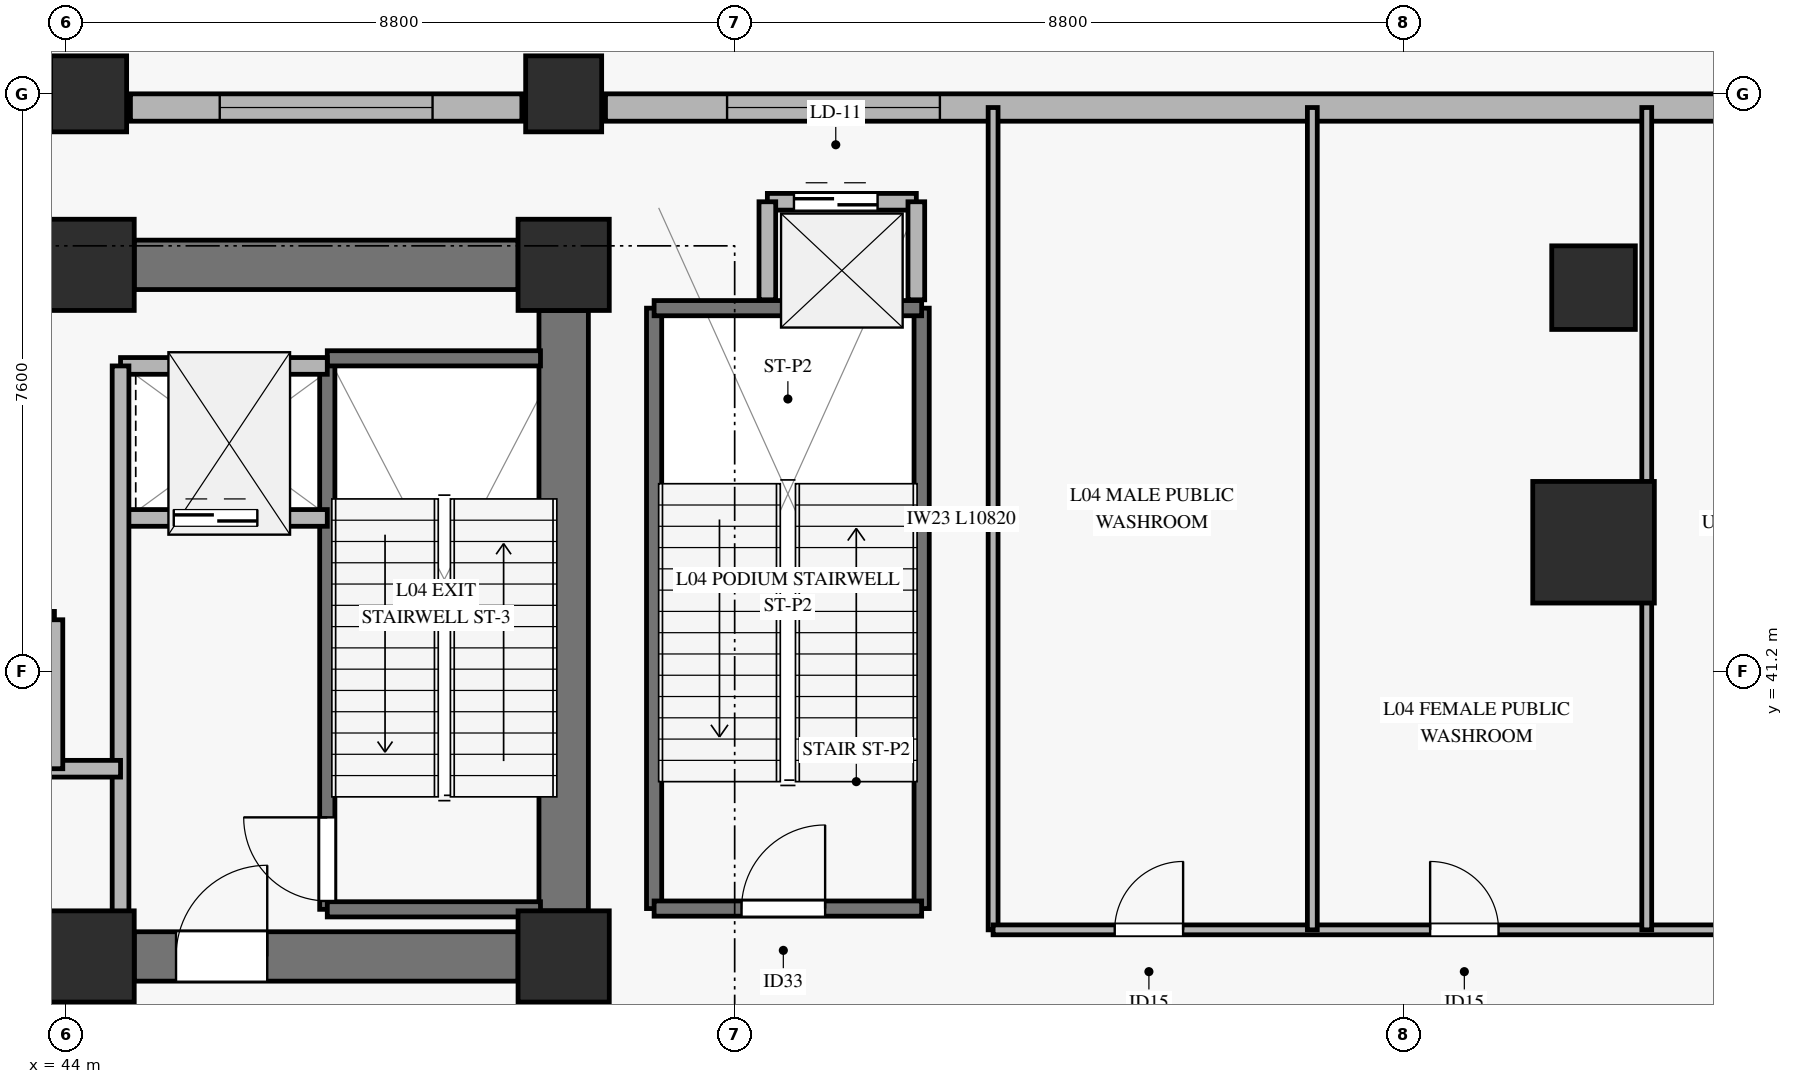
"""IFC4 building model, lengths in metres.
Left out: names, types, materials, properties, quantities, classifications, styles, units other than length and angle.
Written with IfcOpenShell. Run it as: python <this file> out.ifc"""

import sys

from ifc_helpers import new_model, si_unit, direction, frame, frame_2d, origin, origin_2d, place, context, subcontext, project, spatial, rectangle, hollow_rectangle, extrude, source, transform, mapped, element, fill, save


model = new_model("IFC4")
c1 = context("Model", 3, precision=1e-05, world=origin(), true_north=direction((0.0, 1.0)))
c2 = subcontext(c1, "Body", "Model", "MODEL_VIEW")
j1 = project(units=[si_unit("LENGTHUNIT", "METRE"), si_unit("PLANEANGLEUNIT", "RADIAN")], contexts=[c1])
p1 = place(None, origin())
s1 = spatial("IfcSite", under=j1, at=p1, CompositionType="ELEMENT")
p2 = place(p1, origin())
s2 = spatial("IfcBuilding", under=s1, at=p2, CompositionType="ELEMENT")
p3 = place(p2, frame((0.0, 0.0, 15.2)))
s3 = spatial("IfcBuildingStorey", under=s2, at=p3, CompositionType="ELEMENT", Elevation=15.2)
m1 = source(origin(), c2, "Body", "SweptSolid", [
    extrude(rectangle(XDim=1.2, YDim=1.2, at=origin_2d()), origin(), (0.0, 0.0, 1.0), 4.65),
])
for number, where, z_axis, x_axis in (
    (1, (44.3, 37.45, 0.0), (0.0, 0.0, 1.0), (1.0, 0.0, 0.0)),
    (2, (44.3, 46.55, 0.0), (0.0, 0.0, 1.0), (1.0, 0.0, 0.0)),
    (3, (50.55, 37.45, 0.0), (0.0, 0.0, 1.0), (1.0, 0.0, 0.0)),
    (4, (50.55, 46.55, 0.0), (0.0, 0.0, 1.0), (1.0, 0.0, 0.0)),
):
    element("IfcColumn", number, at=place(p3, frame(where, z_axis=z_axis, x_axis=x_axis)), inside=s3, PredefinedType="PILASTER", context=c2, shape_type="MappedRepresentation", body=[
        mapped(m1, transform((0.0, 0.0, 0.0), x_axis=(1.0, 0.0, 0.0), y_axis=(0.0, 1.0, 0.0), z_axis=(0.0, 0.0, 1.0), scale=1.0)),
    ])
p4 = place(p3, frame((44.9, 46.55, 0.0), z_axis=(0.0, 0.0, 1.0), x_axis=(1.0, 0.0, 0.0)))
e5 = element("IfcWall", 5, at=p4, inside=s3, PredefinedType="SHEAR", context=c2, shape_type="SweptSolid", body=[
    extrude(rectangle(XDim=5.05, YDim=0.65, at=frame_2d((2.525, 0.0))), origin(), (0.0, 0.0, 1.0), 4.65),
])
p5 = place(p3, frame((44.9, 37.45, 0.0), z_axis=(0.0, 0.0, 1.0), x_axis=(1.0, 0.0, 0.0)))
e6 = element("IfcWall", 6, at=p5, inside=s3, PredefinedType="SHEAR", context=c2, shape_type="SweptSolid", body=[
    extrude(rectangle(XDim=5.05, YDim=0.65, at=frame_2d((2.525, 0.0))), origin(), (0.0, 0.0, 1.0), 4.65),
])
p6 = place(p5, frame((0.55, 0.0, 0.0)))
e7 = element("IfcOpeningElement", 7, at=p6, cuts=e6, PredefinedType="OPENING", context=c2, shape_type="SweptSolid", body=[
    extrude(rectangle(XDim=1.2, YDim=2.15, at=frame_2d((0.6, 1.075))), frame((0.0, 0.335, 0.0), z_axis=(0.0, -1.0, 0.0), x_axis=(1.0, 0.0, 0.0)), (0.0, 0.0, 1.0), 0.67),
])
p7 = place(p3, frame((50.55, 38.05, 0.0), z_axis=(0.0, 0.0, 1.0), x_axis=(0.0, 1.0, 0.0)))
e8 = element("IfcWall", 8, at=p7, inside=s3, PredefinedType="SHEAR", context=c2, shape_type="SweptSolid", body=[
    extrude(rectangle(XDim=7.9, YDim=0.65, at=frame_2d((3.95, 0.0))), origin(), (0.0, 0.0, 1.0), 4.65),
])
m2 = source(origin(), c2, "Body", "SweptSolid", [
    extrude(hollow_rectangle(XDim=1.6, YDim=1.6, WallThickness=0.075, at=origin_2d()), origin(), (0.0, 0.0, 1.0), 4.65),
])
p8 = place(p3, frame((64.1, 42.9, 0.0), z_axis=(0.0, 0.0, 1.0), x_axis=(1.0, 0.0, 0.0)))
e9 = element("IfcColumn", 9, at=p8, inside=s3, PredefinedType="COLUMN", context=c2, shape_type="MappedRepresentation", body=[
    mapped(m2, transform((0.0, 0.0, 0.0), x_axis=(1.0, 0.0, 0.0), y_axis=(0.0, 1.0, 0.0), z_axis=(0.0, 0.0, 1.0), scale=1.0)),
])
m3 = source(origin(), c2, "Body", "SweptSolid", [
    extrude(hollow_rectangle(XDim=1.1, YDim=1.1, WallThickness=0.05, at=origin_2d()), origin(), (0.0, 0.0, 1.0), 4.65),
])
p9 = place(p3, frame((64.1, 46.25, 0.0), z_axis=(0.0, 0.0, 1.0), x_axis=(1.0, 0.0, 0.0)))
e10 = element("IfcColumn", 10, at=p9, inside=s3, PredefinedType="COLUMN", context=c2, shape_type="MappedRepresentation", body=[
    mapped(m3, transform((0.0, 0.0, 0.0), x_axis=(1.0, 0.0, 0.0), y_axis=(0.0, 1.0, 0.0), z_axis=(0.0, 0.0, 1.0), scale=1.0)),
])
m4 = source(origin(), c2, "Body", "SweptSolid", [
    extrude(hollow_rectangle(XDim=1.0, YDim=1.0, WallThickness=0.045, at=origin_2d()), origin(), (0.0, 0.0, 1.0), 4.65),
])
for number, where, z_axis, x_axis in (
    (11, (44.3, 48.8, 0.0), (0.0, 0.0, 1.0), (1.0, 0.0, 0.0)),
    (12, (50.55, 48.8, 0.0), (0.0, 0.0, 1.0), (1.0, 0.0, 0.0)),
):
    element("IfcColumn", number, at=place(p3, frame(where, z_axis=z_axis, x_axis=x_axis)), inside=s3, PredefinedType="COLUMN", context=c2, shape_type="MappedRepresentation", body=[
        mapped(m4, transform((0.0, 0.0, 0.0), x_axis=(1.0, 0.0, 0.0), y_axis=(0.0, 1.0, 0.0), z_axis=(0.0, 0.0, 1.0), scale=1.0)),
    ])
p10 = place(p3, frame((44.85, 48.62, 0.0), z_axis=(0.0, 0.0, 1.0), x_axis=(1.0, 0.0, 0.0)))
e13 = element("IfcWall", 13, at=p10, inside=s3, PredefinedType="SOLIDWALL", context=c2, shape_type="SweptSolid", body=[
    extrude(rectangle(XDim=5.15, YDim=0.36, at=frame_2d((2.575, 0.0))), origin(), (0.0, 0.0, 1.0), 3.53),
])
p11 = place(p10, frame((1.175, 0.0, 0.72)))
e14 = element("IfcOpeningElement", 14, at=p11, cuts=e13, PredefinedType="OPENING", context=c2, shape_type="SweptSolid", body=[
    extrude(rectangle(XDim=2.8, YDim=2.0, at=frame_2d((1.4, 1.0))), frame((0.0, 0.19, 0.0), z_axis=(0.0, -1.0, 0.0), x_axis=(1.0, 0.0, 0.0)), (0.0, 0.0, 1.0), 0.38),
])
p12 = place(p3, frame((51.1, 48.62, 0.0), z_axis=(0.0, 0.0, 1.0), x_axis=(1.0, 0.0, 0.0)))
e15 = element("IfcWall", 15, at=p12, inside=s3, PredefinedType="SOLIDWALL", context=c2, shape_type="SweptSolid", body=[
    extrude(rectangle(XDim=17.95, YDim=0.36, at=frame_2d((8.975, 0.0))), origin(), (0.0, 0.0, 1.0), 3.53),
])
p13 = place(p12, frame((1.6, 0.0, 0.72)))
e16 = element("IfcOpeningElement", 16, at=p13, cuts=e15, PredefinedType="OPENING", context=c2, shape_type="SweptSolid", body=[
    extrude(rectangle(XDim=2.8, YDim=2.0, at=frame_2d((1.4, 1.0))), frame((0.0, 0.19, 0.0), z_axis=(0.0, -1.0, 0.0), x_axis=(1.0, 0.0, 0.0)), (0.0, 0.0, 1.0), 0.38),
])
p14 = place(p3, frame((47.44, 38.07, 0.0), z_axis=(0.0, 0.0, 1.0), x_axis=(0.0, 1.0, 0.0)))
e17 = element("IfcWall", 17, at=p14, inside=s3, PredefinedType="SOLIDWALL", context=c2, shape_type="SweptSolid", body=[
    extrude(rectangle(XDim=7.25, YDim=0.2, at=frame_2d((3.625, 0.0))), origin(), (0.0, 0.0, 1.0), 5.0),
])
p15 = place(p14, frame((0.11, 0.0, 0.0)))
e18 = element("IfcOpeningElement", 18, at=p15, cuts=e17, PredefinedType="OPENING", context=c2, shape_type="SweptSolid", body=[
    extrude(rectangle(XDim=1.1, YDim=2.15, at=frame_2d((0.55, 1.075))), frame((0.0, 0.11, 0.0), z_axis=(0.0, -1.0, 0.0), x_axis=(1.0, 0.0, 0.0)), (0.0, 0.0, 1.0), 0.22),
])
for number, where, z_axis, x_axis in (
    (19, (47.44, 45.32, 0.0), (0.0, 0.0, 1.0), (1.0, 0.0, 0.0)),
    (20, (47.44, 38.07, 0.0), (0.0, 0.0, 1.0), (1.0, 0.0, 0.0)),
):
    element("IfcWall", number, at=place(p3, frame(where, z_axis=z_axis, x_axis=x_axis)), inside=s3, PredefinedType="SOLIDWALL", context=c2, shape_type="SweptSolid", body=[
        extrude(rectangle(XDim=2.805, YDim=0.2, at=frame_2d((1.403, 0.0))), origin(), (0.0, 0.0, 1.0), 5.0),
    ])
p16 = place(p3, frame((44.72, 43.22, 0.0), z_axis=(0.0, 0.0, 1.0), x_axis=(1.0, 0.0, 0.0)))
e21 = element("IfcWall", 21, at=p16, inside=s3, PredefinedType="SOLIDWALL", context=c2, shape_type="SweptSolid", body=[
    extrude(rectangle(XDim=2.72, YDim=0.22, at=frame_2d((1.36, 0.0))), origin(), (0.0, 0.0, 1.0), 4.65),
])
p17 = place(p16, frame((0.7, 0.0, 0.0)))
e22 = element("IfcOpeningElement", 22, at=p17, cuts=e21, PredefinedType="OPENING", context=c2, shape_type="SweptSolid", body=[
    extrude(rectangle(XDim=1.1, YDim=2.2, at=frame_2d((0.55, 1.1))), frame((0.0, 0.12, 0.0), z_axis=(0.0, -1.0, 0.0), x_axis=(1.0, 0.0, 0.0)), (0.0, 0.0, 1.0), 0.24),
])
p18 = place(p3, frame((44.72, 45.22, 0.0), z_axis=(0.0, 0.0, 1.0), x_axis=(1.0, 0.0, 0.0)))
e23 = element("IfcWall", 23, at=p18, inside=s3, PredefinedType="SOLIDWALL", context=c2, shape_type="SweptSolid", body=[
    extrude(rectangle(XDim=2.72, YDim=0.22, at=frame_2d((1.36, 0.0))), origin(), (0.0, 0.0, 1.0), 4.65),
])
p19 = place(p3, frame((44.72, 37.755, 0.0), z_axis=(0.0, 0.0, 1.0), x_axis=(0.0, 1.0, 0.0)))
e24 = element("IfcWall", 24, at=p19, inside=s3, PredefinedType="SOLIDWALL", context=c2, shape_type="SweptSolid", body=[
    extrude(rectangle(XDim=7.465, YDim=0.22, at=frame_2d((3.732, 0.0))), origin(), (0.0, 0.0, 1.0), 4.65),
])
for number, where, z_axis, x_axis in (
    (25, (51.74, 38.08, 0.0), (0.0, 0.0, 1.0), (0.0, 1.0, 0.0)),
    (26, (55.26, 38.08, 0.0), (0.0, 0.0, 1.0), (0.0, 1.0, 0.0)),
):
    element("IfcWall", number, at=place(p3, frame(where, z_axis=z_axis, x_axis=x_axis)), inside=s3, PredefinedType="SOLIDWALL", context=c2, shape_type="SweptSolid", body=[
        extrude(rectangle(XDim=7.9, YDim=0.2, at=frame_2d((3.95, 0.0))), origin(), (0.0, 0.0, 1.0), 5.0),
    ])
p20 = place(p3, frame((51.74, 45.98, 0.0), z_axis=(0.0, 0.0, 1.0), x_axis=(1.0, 0.0, 0.0)))
e27 = element("IfcWall", 27, at=p20, inside=s3, PredefinedType="SOLIDWALL", context=c2, shape_type="SweptSolid", body=[
    extrude(rectangle(XDim=3.52, YDim=0.2, at=frame_2d((1.76, 0.0))), origin(), (0.0, 0.0, 1.0), 5.0),
])
p21 = place(p3, frame((51.74, 38.08, 0.0), z_axis=(0.0, 0.0, 1.0), x_axis=(1.0, 0.0, 0.0)))
e28 = element("IfcWall", 28, at=p21, inside=s3, PredefinedType="SOLIDWALL", context=c2, shape_type="SweptSolid", body=[
    extrude(rectangle(XDim=3.52, YDim=0.2, at=frame_2d((1.76, 0.0))), origin(), (0.0, 0.0, 1.0), 5.0),
])
p22 = place(p21, frame((1.15, 0.0, 0.0)))
e29 = element("IfcOpeningElement", 29, at=p22, cuts=e28, PredefinedType="OPENING", context=c2, shape_type="SweptSolid", body=[
    extrude(rectangle(XDim=1.1, YDim=2.15, at=frame_2d((0.55, 1.075))), frame((0.0, 0.11, 0.0), z_axis=(0.0, -1.0, 0.0), x_axis=(1.0, 0.0, 0.0)), (0.0, 0.0, 1.0), 0.22),
])
p23 = place(p3, frame((53.23, 47.38, 0.0), z_axis=(0.0, 0.0, 1.0), x_axis=(1.0, 0.0, 0.0)))
e30 = element("IfcWall", 30, at=p23, inside=s3, PredefinedType="SOLIDWALL", context=c2, shape_type="SweptSolid", body=[
    extrude(rectangle(XDim=1.96, YDim=0.22, at=frame_2d((0.98, 0.0))), origin(), (0.0, 0.0, 1.0), 4.65),
])
p24 = place(p23, frame((0.35, 0.0, 0.0)))
e31 = element("IfcOpeningElement", 31, at=p24, cuts=e30, PredefinedType="OPENING", context=c2, shape_type="SweptSolid", body=[
    extrude(rectangle(XDim=1.1, YDim=2.2, at=frame_2d((0.55, 1.1))), frame((0.0, 0.12, 0.0), z_axis=(0.0, -1.0, 0.0), x_axis=(1.0, 0.0, 0.0)), (0.0, 0.0, 1.0), 0.24),
])
for number, where, z_axis, x_axis in (
    (32, (53.23, 46.09, 0.0), (0.0, 0.0, 1.0), (0.0, 1.0, 0.0)),
    (33, (55.19, 46.09, 0.0), (0.0, 0.0, 1.0), (0.0, 1.0, 0.0)),
):
    element("IfcWall", number, at=place(p3, frame(where, z_axis=z_axis, x_axis=x_axis)), inside=s3, PredefinedType="SOLIDWALL", context=c2, shape_type="SweptSolid", body=[
        extrude(rectangle(XDim=1.29, YDim=0.22, at=frame_2d((0.645, 0.0))), origin(), (0.0, 0.0, 1.0), 4.65),
    ])
p25 = place(p3, frame((36.12, 41.88, 0.0), z_axis=(0.0, 0.0, 1.0), x_axis=(1.0, 0.0, 0.0)))
e34 = element("IfcWall", 34, at=p25, inside=s3, PredefinedType="SOLIDWALL", context=c2, shape_type="SweptSolid", body=[
    extrude(rectangle(XDim=7.73, YDim=0.22, at=frame_2d((3.865, 0.0))), origin(), (0.0, 0.0, 1.0), 4.65),
])
p26 = place(p25, frame((6.26, 0.0, 0.0)))
e35 = element("IfcOpeningElement", 35, at=p26, cuts=e34, PredefinedType="OPENING", context=c2, shape_type="SweptSolid", body=[
    extrude(rectangle(XDim=1.1, YDim=2.2, at=frame_2d((0.55, 1.1))), frame((0.0, 0.12, 0.0), z_axis=(0.0, -1.0, 0.0), x_axis=(1.0, 0.0, 0.0)), (0.0, 0.0, 1.0), 0.24),
])
p27 = place(p3, frame((36.12, 39.92, 0.0), z_axis=(0.0, 0.0, 1.0), x_axis=(1.0, 0.0, 0.0)))
e36 = element("IfcWall", 36, at=p27, inside=s3, PredefinedType="SOLIDWALL", context=c2, shape_type="SweptSolid", body=[
    extrude(rectangle(XDim=8.6, YDim=0.22, at=frame_2d((4.3, 0.0))), origin(), (0.0, 0.0, 1.0), 3.935),
])
p28 = place(p3, frame((43.85, 39.92, 0.0), z_axis=(0.0, 0.0, 1.0), x_axis=(0.0, 1.0, 0.0)))
e37 = element("IfcWall", 37, at=p28, inside=s3, PredefinedType="SOLIDWALL", context=c2, shape_type="SweptSolid", body=[
    extrude(rectangle(XDim=1.96, YDim=0.22, at=frame_2d((0.98, 0.0))), origin(), (0.0, 0.0, 1.0), 4.65),
])
p29 = place(p3, frame((56.2, 37.8, 0.0), z_axis=(0.0, 0.0, 1.0), x_axis=(0.0, 1.0, 0.0)))
e38 = element("IfcWall", 38, at=p29, inside=s3, PredefinedType="PARTITIONING", context=c2, shape_type="SweptSolid", body=[
    extrude(rectangle(XDim=10.82, YDim=0.13, at=frame_2d((5.41, 0.0))), origin(), (0.0, 0.0, 1.0), 4.65),
])
p30 = place(p3, frame((56.2, 37.8, 0.0), z_axis=(0.0, 0.0, 1.0), x_axis=(1.0, 0.0, 0.0)))
e39 = element("IfcWall", 39, at=p30, inside=s3, PredefinedType="PARTITIONING", context=c2, shape_type="SweptSolid", body=[
    extrude(rectangle(XDim=13.22, YDim=0.13, at=frame_2d((6.61, 0.0))), origin(), (0.0, 0.0, 1.0), 3.535),
])
p31 = place(p30, frame((1.6, 0.0, 0.0)))
e40 = element("IfcOpeningElement", 40, at=p31, cuts=e39, PredefinedType="OPENING", context=c2, shape_type="SweptSolid", body=[
    extrude(rectangle(XDim=0.9, YDim=2.1, at=frame_2d((0.45, 1.05))), frame((0.0, 0.075, 0.0), z_axis=(0.0, -1.0, 0.0), x_axis=(1.0, 0.0, 0.0)), (0.0, 0.0, 1.0), 0.15),
])
p32 = place(p30, frame((5.75, 0.0, 0.0)))
e41 = element("IfcOpeningElement", 41, at=p32, cuts=e39, PredefinedType="OPENING", context=c2, shape_type="SweptSolid", body=[
    extrude(rectangle(XDim=0.9, YDim=2.1, at=frame_2d((0.45, 1.05))), frame((0.0, 0.075, 0.0), z_axis=(0.0, -1.0, 0.0), x_axis=(1.0, 0.0, 0.0)), (0.0, 0.0, 1.0), 0.15),
])
p33 = place(p30, frame((10.05, 0.0, 0.0)))
e42 = element("IfcOpeningElement", 42, at=p33, cuts=e39, PredefinedType="OPENING", context=c2, shape_type="SweptSolid", body=[
    extrude(rectangle(XDim=0.9, YDim=2.1, at=frame_2d((0.45, 1.05))), frame((0.0, 0.075, 0.0), z_axis=(0.0, -1.0, 0.0), x_axis=(1.0, 0.0, 0.0)), (0.0, 0.0, 1.0), 0.15),
])
p34 = place(p3, frame((60.4, 37.8, 0.0), z_axis=(0.0, 0.0, 1.0), x_axis=(0.0, 1.0, 0.0)))
e43 = element("IfcWall", 43, at=p34, inside=s3, PredefinedType="PARTITIONING", context=c2, shape_type="SweptSolid", body=[
    extrude(rectangle(XDim=10.82, YDim=0.13, at=frame_2d((5.41, 0.0))), origin(), (0.0, 0.0, 1.0), 4.65),
])
p35 = place(p3, frame((64.8, 37.8, 0.0), z_axis=(0.0, 0.0, 1.0), x_axis=(0.0, 1.0, 0.0)))
e44 = element("IfcWall", 44, at=p35, inside=s3, PredefinedType="PARTITIONING", context=c2, shape_type="SweptSolid", body=[
    extrude(rectangle(XDim=10.82, YDim=0.13, at=frame_2d((5.41, 0.0))), origin(), (0.0, 0.0, 1.0), 3.535),
])
m5 = source(origin(), c2, "Body", "SweptSolid", [
    extrude(rectangle(XDim=2.8, YDim=2.0, at=frame_2d((1.4, 1.0))), frame((0.0, 0.03, 0.0), z_axis=(0.0, -1.0, 0.0), x_axis=(1.0, 0.0, 0.0)), (0.0, 0.0, 1.0), 0.06),
])
p36 = place(p11, origin())
e45 = element("IfcWindow", 45, at=p36, inside=s3, PartitioningType="SINGLE_PANEL", PredefinedType="WINDOW", context=c2, shape_type="MappedRepresentation", body=[
    mapped(m5, transform((0.0, 0.0, 0.0), x_axis=(1.0, 0.0, 0.0), y_axis=(0.0, 1.0, 0.0), z_axis=(0.0, 0.0, 1.0), scale=1.0)),
])
fill(e14, e45)
p37 = place(p13, origin())
e46 = element("IfcWindow", 46, at=p37, inside=s3, PartitioningType="SINGLE_PANEL", PredefinedType="WINDOW", context=c2, shape_type="MappedRepresentation", body=[
    mapped(m5, transform((0.0, 0.0, 0.0), x_axis=(1.0, 0.0, 0.0), y_axis=(0.0, 1.0, 0.0), z_axis=(0.0, 0.0, 1.0), scale=1.0)),
])
fill(e16, e46)
m6 = source(origin(), c2, "Body", "SweptSolid", [
    extrude(rectangle(XDim=1.1, YDim=2.15, at=frame_2d((0.55, 1.075))), frame((0.0, 0.025, 0.0), z_axis=(0.0, -1.0, 0.0), x_axis=(1.0, 0.0, 0.0)), (0.0, 0.0, 1.0), 0.05),
])
p38 = place(p15, origin())
e47 = element("IfcDoor", 47, at=p38, inside=s3, OperationType="SINGLE_SWING_RIGHT", PredefinedType="DOOR", context=c2, shape_type="MappedRepresentation", body=[
    mapped(m6, transform((0.0, 0.0, 0.0), x_axis=(1.0, 0.0, 0.0), y_axis=(0.0, 1.0, 0.0), z_axis=(0.0, 0.0, 1.0), scale=1.0)),
])
fill(e18, e47)
m7 = source(origin(), c2, "Body", "SweptSolid", [
    extrude(rectangle(XDim=1.1, YDim=2.2, at=frame_2d((0.55, 1.1))), frame((0.0, 0.025, 0.0), z_axis=(0.0, -1.0, 0.0), x_axis=(1.0, 0.0, 0.0)), (0.0, 0.0, 1.0), 0.05),
])
p39 = place(p17, origin())
e48 = element("IfcDoor", 48, at=p39, inside=s3, OperationType="SLIDING_TO_LEFT", PredefinedType="DOOR", context=c2, shape_type="MappedRepresentation", body=[
    mapped(m7, transform((0.0, 0.0, 0.0), x_axis=(1.0, 0.0, 0.0), y_axis=(0.0, 1.0, 0.0), z_axis=(0.0, 0.0, 1.0), scale=1.0)),
])
fill(e22, e48)
m8 = source(origin(), c2, "Body", "SweptSolid", [
    extrude(rectangle(XDim=1.2, YDim=2.15, at=frame_2d((0.6, 1.075))), frame((0.0, 0.025, 0.0), z_axis=(0.0, -1.0, 0.0), x_axis=(1.0, 0.0, 0.0)), (0.0, 0.0, 1.0), 0.05),
])
p40 = place(p6, origin())
e49 = element("IfcDoor", 49, at=p40, inside=s3, OperationType="SINGLE_SWING_RIGHT", PredefinedType="DOOR", context=c2, shape_type="MappedRepresentation", body=[
    mapped(m8, transform((0.0, 0.0, 0.0), x_axis=(1.0, 0.0, 0.0), y_axis=(0.0, 1.0, 0.0), z_axis=(0.0, 0.0, 1.0), scale=1.0)),
])
fill(e7, e49)
p41 = place(p22, origin())
e50 = element("IfcDoor", 50, at=p41, inside=s3, OperationType="SINGLE_SWING_RIGHT", PredefinedType="DOOR", context=c2, shape_type="MappedRepresentation", body=[
    mapped(m6, transform((0.0, 0.0, 0.0), x_axis=(1.0, 0.0, 0.0), y_axis=(0.0, 1.0, 0.0), z_axis=(0.0, 0.0, 1.0), scale=1.0)),
])
fill(e29, e50)
p42 = place(p24, origin())
e51 = element("IfcDoor", 51, at=p42, inside=s3, OperationType="SLIDING_TO_LEFT", PredefinedType="DOOR", context=c2, shape_type="MappedRepresentation", body=[
    mapped(m7, transform((0.0, 0.0, 0.0), x_axis=(1.0, 0.0, 0.0), y_axis=(0.0, 1.0, 0.0), z_axis=(0.0, 0.0, 1.0), scale=1.0)),
])
fill(e31, e51)
m9 = source(origin(), c2, "Body", "SweptSolid", [
    extrude(rectangle(XDim=0.9, YDim=2.1, at=frame_2d((0.45, 1.05))), frame((0.0, 0.025, 0.0), z_axis=(0.0, -1.0, 0.0), x_axis=(1.0, 0.0, 0.0)), (0.0, 0.0, 1.0), 0.05),
])
p43 = place(p31, origin())
e52 = element("IfcDoor", 52, at=p43, inside=s3, OperationType="SINGLE_SWING_RIGHT", PredefinedType="DOOR", context=c2, shape_type="MappedRepresentation", body=[
    mapped(m9, transform((0.0, 0.0, 0.0), x_axis=(1.0, 0.0, 0.0), y_axis=(0.0, 1.0, 0.0), z_axis=(0.0, 0.0, 1.0), scale=1.0)),
])
fill(e40, e52)
p44 = place(p32, origin())
e53 = element("IfcDoor", 53, at=p44, inside=s3, OperationType="SINGLE_SWING_LEFT", PredefinedType="DOOR", context=c2, shape_type="MappedRepresentation", body=[
    mapped(m9, transform((0.0, 0.0, 0.0), x_axis=(1.0, 0.0, 0.0), y_axis=(0.0, 1.0, 0.0), z_axis=(0.0, 0.0, 1.0), scale=1.0)),
])
fill(e41, e53)
save(model, sys.argv[1])
